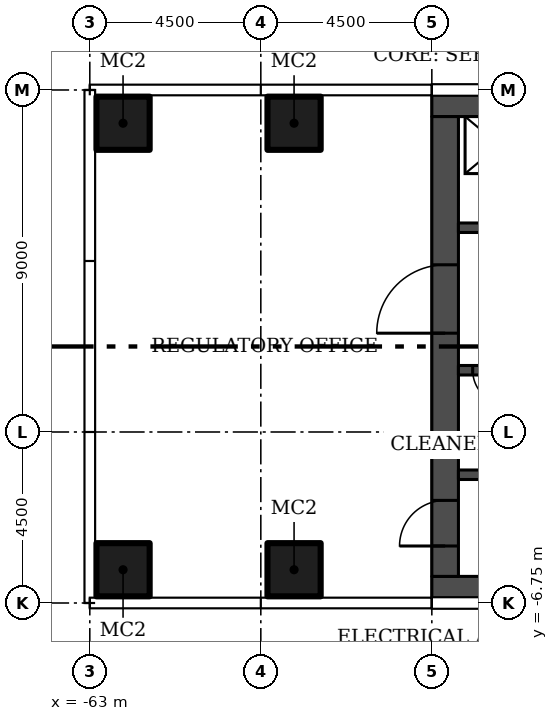
"""IFC4 building model, lengths in metres.
Left out: names, types, materials, properties, quantities, classifications, styles, units other than length and angle.
Written with IfcOpenShell. Run it as: python <this file> out.ifc"""

import sys

from ifc_helpers import new_model, si_unit, direction, frame, frame_2d, origin, origin_2d, place, context, subcontext, project, spatial, rectangle, hollow_rectangle, extrude, element, fill, save


model = new_model("IFC4")
c1 = context("Model", 3, precision=1e-05, world=origin(), true_north=direction((0.0, 1.0)))
c2 = subcontext(c1, "Body", "Model", "MODEL_VIEW")
j1 = project(units=[si_unit("LENGTHUNIT", "METRE"), si_unit("PLANEANGLEUNIT", "RADIAN")], contexts=[c1])
p1 = place(None, origin())
s1 = spatial("IfcSite", under=j1, at=p1, CompositionType="ELEMENT")
p2 = place(p1, origin())
s2 = spatial("IfcBuilding", under=s1, at=p2, CompositionType="ELEMENT")
p3 = place(p2, frame((0.0, 0.0, 65.4)))
s3 = spatial("IfcBuildingStorey", under=s2, at=p3, CompositionType="ELEMENT", Elevation=65.4)
for number, where in (
    (1, (-57.625, -5.875, 0.0)),
    (2, (-62.125, -5.875, 0.0)),
    (3, (-57.625, 5.875, 0.0)),
    (4, (-62.125, 5.875, 0.0)),
):
    element("IfcColumn", number, at=place(p3, frame(where)), inside=s3, PredefinedType="COLUMN", context=c2, shape_type="SweptSolid", body=[
        extrude(hollow_rectangle(XDim=1.4, YDim=1.4, WallThickness=0.05, at=origin_2d()), origin(), (0.0, 0.0, 1.0), 3.55),
    ])
for number, where, z_axis, x_axis in (
    (5, (-40.5, -6.4, 0.0), (0.0, 0.0, 1.0), (-1.0, 0.0, 0.0)),
    (6, (-40.5, 6.4, 0.0), (0.0, 0.0, 1.0), (-1.0, 0.0, 0.0)),
):
    element("IfcWall", number, at=place(p3, frame(where, z_axis=z_axis, x_axis=x_axis)), inside=s3, PredefinedType="SHEAR", context=c2, shape_type="SweptSolid", body=[
        extrude(rectangle(XDim=13.5, YDim=0.7, at=frame_2d((6.75, 0.0))), origin(), (0.0, 0.0, 1.0), 3.55),
    ])
p4 = place(p3, frame((-53.65, -6.05, 0.0), z_axis=(0.0, 0.0, 1.0), x_axis=(0.0, 1.0, 0.0)))
e7 = element("IfcWall", 7, at=p4, inside=s3, PredefinedType="SHEAR", context=c2, shape_type="SweptSolid", body=[
    extrude(rectangle(XDim=12.1, YDim=0.7, at=frame_2d((6.05, 0.0))), origin(), (0.0, 0.0, 1.0), 3.55),
])
p5 = place(p4, frame((0.8, 0.0, 0.0)))
e8 = element("IfcOpeningElement", 8, at=p5, cuts=e7, PredefinedType="OPENING", context=c2, shape_type="SweptSolid", body=[
    extrude(rectangle(XDim=1.2, YDim=2.1, at=frame_2d((0.6, 1.05))), frame((0.0, 0.36, 0.0), z_axis=(0.0, -1.0, 0.0), x_axis=(1.0, 0.0, 0.0)), (0.0, 0.0, 1.0), 0.72),
])
p6 = place(p4, frame((6.4, 0.0, 0.0)))
e9 = element("IfcOpeningElement", 9, at=p6, cuts=e7, PredefinedType="OPENING", context=c2, shape_type="SweptSolid", body=[
    extrude(rectangle(XDim=1.8, YDim=2.4, at=frame_2d((0.9, 1.2))), frame((0.0, 0.36, 0.0), z_axis=(0.0, -1.0, 0.0), x_axis=(1.0, 0.0, 0.0)), (0.0, 0.0, 1.0), 0.72),
])
p7 = place(p3, frame((-41.2, -3.375, 0.0), z_axis=(0.0, 0.0, 1.0), x_axis=(-1.0, 0.0, 0.0)))
e10 = element("IfcWall", 10, at=p7, inside=s3, PredefinedType="SHEAR", context=c2, shape_type="SweptSolid", body=[
    extrude(rectangle(XDim=12.1, YDim=0.25, at=frame_2d((6.05, 0.0))), origin(), (0.0, 0.0, 1.0), 3.55),
])
p8 = place(p7, frame((0.05, 0.0, 0.0)))
e11 = element("IfcOpeningElement", 11, at=p8, cuts=e10, PredefinedType="OPENING", context=c2, shape_type="SweptSolid", body=[
    extrude(rectangle(XDim=1.1, YDim=2.1, at=frame_2d((0.55, 1.05))), frame((0.0, 0.135, 0.0), z_axis=(0.0, -1.0, 0.0), x_axis=(1.0, 0.0, 0.0)), (0.0, 0.0, 1.0), 0.27),
])
p9 = place(p3, frame((-41.2, -0.625, 0.0), z_axis=(0.0, 0.0, 1.0), x_axis=(-1.0, 0.0, 0.0)))
e12 = element("IfcWall", 12, at=p9, inside=s3, PredefinedType="SHEAR", context=c2, shape_type="SweptSolid", body=[
    extrude(rectangle(XDim=12.1, YDim=0.25, at=frame_2d((6.05, 0.0))), origin(), (0.0, 0.0, 1.0), 3.55),
])
p10 = place(p9, frame((2.25, 0.0, 0.0)))
e13 = element("IfcOpeningElement", 13, at=p10, cuts=e12, PredefinedType="OPENING", context=c2, shape_type="SweptSolid", body=[
    extrude(rectangle(XDim=1.2, YDim=2.1, at=frame_2d((0.6, 1.05))), frame((0.0, 0.135, 0.0), z_axis=(0.0, -1.0, 0.0), x_axis=(1.0, 0.0, 0.0)), (0.0, 0.0, 1.0), 0.27),
])
p11 = place(p9, frame((9.2, 0.0, 0.0)))
e14 = element("IfcOpeningElement", 14, at=p11, cuts=e12, PredefinedType="OPENING", context=c2, shape_type="SweptSolid", body=[
    extrude(rectangle(XDim=0.9, YDim=2.1, at=frame_2d((0.45, 1.05))), frame((0.0, 0.135, 0.0), z_axis=(0.0, -1.0, 0.0), x_axis=(1.0, 0.0, 0.0)), (0.0, 0.0, 1.0), 0.27),
])
p12 = place(p9, frame((10.825, 0.0, 0.0)))
e15 = element("IfcOpeningElement", 15, at=p12, cuts=e12, PredefinedType="OPENING", context=c2, shape_type="SweptSolid", body=[
    extrude(rectangle(XDim=0.9, YDim=2.1, at=frame_2d((0.45, 1.05))), frame((0.0, 0.135, 0.0), z_axis=(0.0, -1.0, 0.0), x_axis=(1.0, 0.0, 0.0)), (0.0, 0.0, 1.0), 0.27),
])
p13 = place(p3, frame((-48.5, 3.125, 0.0), z_axis=(0.0, 0.0, 1.0), x_axis=(-1.0, 0.0, 0.0)))
e16 = element("IfcWall", 16, at=p13, inside=s3, PredefinedType="SHEAR", context=c2, shape_type="SweptSolid", body=[
    extrude(rectangle(XDim=4.8, YDim=0.25, at=frame_2d((2.4, 0.0))), origin(), (0.0, 0.0, 1.0), 3.55),
])
p14 = place(p13, frame((0.775, 0.0, 0.0)))
e17 = element("IfcOpeningElement", 17, at=p14, cuts=e16, PredefinedType="OPENING", context=c2, shape_type="SweptSolid", body=[
    extrude(rectangle(XDim=1.1, YDim=2.1, at=frame_2d((0.55, 1.05))), frame((0.0, 0.135, 0.0), z_axis=(0.0, -1.0, 0.0), x_axis=(1.0, 0.0, 0.0)), (0.0, 0.0, 1.0), 0.27),
])
p15 = place(p5, origin())
e18 = element("IfcDoor", 18, at=p15, inside=s3, OperationType="SINGLE_SWING_LEFT", PredefinedType="DOOR", context=c2, shape_type="SweptSolid", body=[
    extrude(rectangle(XDim=1.2, YDim=2.1, at=frame_2d((0.6, 1.05))), frame((0.0, 0.025, 0.0), z_axis=(0.0, -1.0, 0.0), x_axis=(1.0, 0.0, 0.0)), (0.0, 0.0, 1.0), 0.05),
])
fill(e8, e18)
p16 = place(p6, origin())
e19 = element("IfcDoor", 19, at=p16, inside=s3, OperationType="DOUBLE_DOOR_SINGLE_SWING", PredefinedType="DOOR", context=c2, shape_type="SweptSolid", body=[
    extrude(rectangle(XDim=1.8, YDim=2.4, at=frame_2d((0.9, 1.2))), frame((0.0, 0.025, 0.0), z_axis=(0.0, -1.0, 0.0), x_axis=(1.0, 0.0, 0.0)), (0.0, 0.0, 1.0), 0.05),
])
fill(e9, e19)
p17 = place(p12, origin())
e20 = element("IfcDoor", 20, at=p17, inside=s3, OperationType="SINGLE_SWING_RIGHT", PredefinedType="DOOR", context=c2, shape_type="SweptSolid", body=[
    extrude(rectangle(XDim=0.9, YDim=2.1, at=frame_2d((0.45, 1.05))), frame((0.0, 0.025, 0.0), z_axis=(0.0, -1.0, 0.0), x_axis=(1.0, 0.0, 0.0)), (0.0, 0.0, 1.0), 0.05),
])
fill(e15, e20)
save(model, sys.argv[1])
